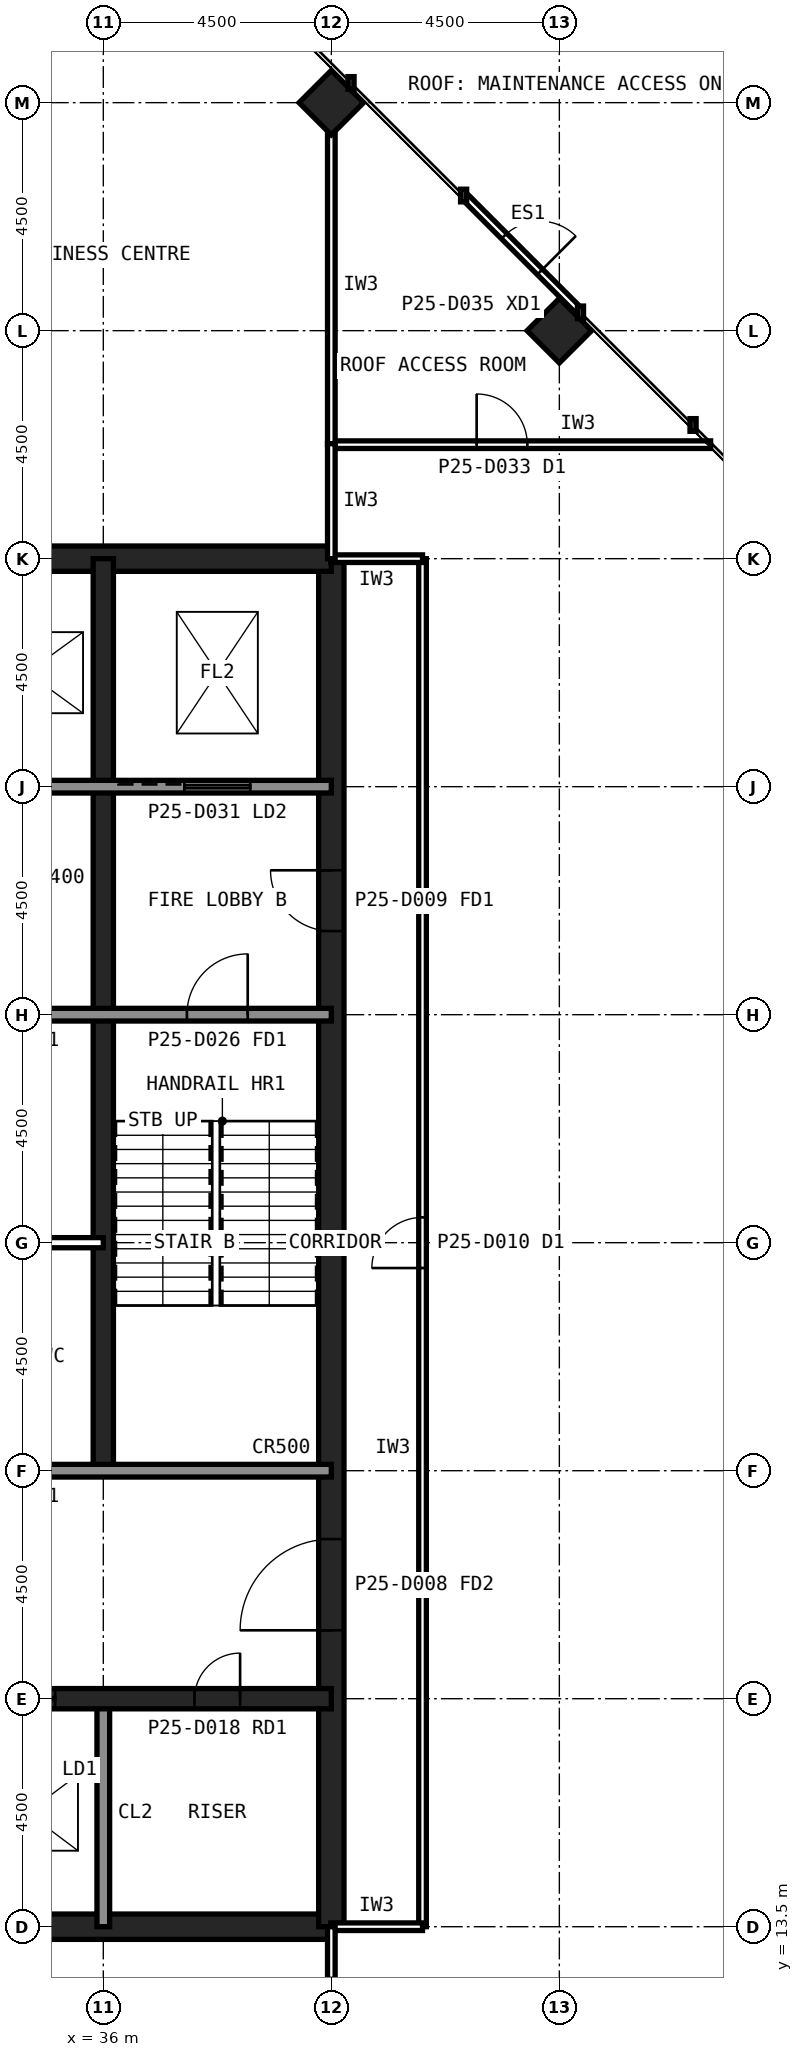
"""IFC4 building model, lengths in metres.
Left out: names, types, materials, properties, quantities, classifications, styles, units other than length and angle.
Written with IfcOpenShell. Run it as: python <this file> out.ifc"""

import sys

from ifc_helpers import new_model, si_unit, direction, frame, frame_2d, origin, origin_2d, place, context, subcontext, project, spatial, rectangle, hollow_rectangle, extrude, element, fill, save


model = new_model("IFC4")
c1 = context("Model", 3, precision=1e-05, world=origin(), true_north=direction((0.0, 1.0)))
c2 = subcontext(c1, "Body", "Model", "MODEL_VIEW")
j1 = project(units=[si_unit("LENGTHUNIT", "METRE"), si_unit("PLANEANGLEUNIT", "RADIAN")], contexts=[c1])
p1 = place(None, origin())
s1 = spatial("IfcSite", under=j1, at=p1, CompositionType="ELEMENT")
p2 = place(p1, origin())
s2 = spatial("IfcBuilding", under=s1, at=p2, CompositionType="ELEMENT")
p3 = place(p2, frame((0.0, 0.0, 110.6)))
s3 = spatial("IfcBuildingStorey", under=s2, at=p3, CompositionType="ELEMENT", Elevation=110.6)
for number, where, z_axis, x_axis in (
    (1, (45.0, 45.0, 0.0), (0.0, 0.0, 1.0), (0.707, 0.707, 0.0)),
    (2, (40.5, 49.5, 0.0), (0.0, 0.0, 1.0), (0.707, 0.707, 0.0)),
):
    element("IfcColumn", number, at=place(p3, frame(where, z_axis=z_axis, x_axis=x_axis)), inside=s3, PredefinedType="COLUMN", context=c2, shape_type="SweptSolid", body=[
        extrude(hollow_rectangle(XDim=0.9, YDim=0.9, WallThickness=0.063, at=origin_2d()), origin(), (0.0, 0.0, 1.0), 5.0),
    ])
p4 = place(p3, frame((13.5, 13.5, 0.0), z_axis=(0.0, 0.0, 1.0), x_axis=(1.0, 0.0, 0.0)))
e3 = element("IfcWall", 3, at=p4, inside=s3, PredefinedType="SHEAR", context=c2, shape_type="SweptSolid", body=[
    extrude(rectangle(XDim=27.0, YDim=0.5, at=frame_2d((13.5, 0.0))), origin(), (0.0, 0.0, 1.0), 5.0),
])
p5 = place(p3, frame((40.5, 13.5, 0.0), z_axis=(0.0, 0.0, 1.0), x_axis=(0.0, 1.0, 0.0)))
e4 = element("IfcWall", 4, at=p5, inside=s3, PredefinedType="SHEAR", context=c2, shape_type="SweptSolid", body=[
    extrude(rectangle(XDim=27.0, YDim=0.5, at=frame_2d((13.5, 0.0))), origin(), (0.0, 0.0, 1.0), 5.0),
])
p6 = place(p5, frame((5.85, 0.0, 0.0)))
e5 = element("IfcOpeningElement", 5, at=p6, cuts=e4, PredefinedType="OPENING", context=c2, shape_type="SweptSolid", body=[
    extrude(rectangle(XDim=1.8, YDim=2.1, at=frame_2d((0.9, 1.05))), frame((0.0, 0.26, 0.0), z_axis=(0.0, -1.0, 0.0), x_axis=(1.0, 0.0, 0.0)), (0.0, 0.0, 1.0), 0.52),
])
p7 = place(p5, frame((19.65, 0.0, 0.0)))
e6 = element("IfcOpeningElement", 6, at=p7, cuts=e4, PredefinedType="OPENING", context=c2, shape_type="SweptSolid", body=[
    extrude(rectangle(XDim=1.2, YDim=2.1, at=frame_2d((0.6, 1.05))), frame((0.0, 0.26, 0.0), z_axis=(0.0, -1.0, 0.0), x_axis=(1.0, 0.0, 0.0)), (0.0, 0.0, 1.0), 0.52),
])
p8 = place(p3, frame((40.5, 40.5, 0.0), z_axis=(0.0, 0.0, 1.0), x_axis=(-1.0, 0.0, 0.0)))
e7 = element("IfcWall", 7, at=p8, inside=s3, PredefinedType="SHEAR", context=c2, shape_type="SweptSolid", body=[
    extrude(rectangle(XDim=27.0, YDim=0.5, at=frame_2d((13.5, 0.0))), origin(), (0.0, 0.0, 1.0), 5.0),
])
p9 = place(p3, frame((36.0, 13.5, 0.0), z_axis=(0.0, 0.0, 1.0), x_axis=(0.0, 1.0, 0.0)))
e8 = element("IfcWall", 8, at=p9, inside=s3, PredefinedType="SOLIDWALL", context=c2, shape_type="SweptSolid", body=[
    extrude(rectangle(XDim=4.5, YDim=0.25, at=frame_2d((2.25, 0.0))), origin(), (0.0, 0.0, 1.0), 4.84),
])
p10 = place(p3, frame((36.0, 22.5, 0.0), z_axis=(0.0, 0.0, 1.0), x_axis=(0.0, 1.0, 0.0)))
e9 = element("IfcWall", 9, at=p10, inside=s3, PredefinedType="SHEAR", context=c2, shape_type="SweptSolid", body=[
    extrude(rectangle(XDim=18.0, YDim=0.4, at=frame_2d((9.0, 0.0))), origin(), (0.0, 0.0, 1.0), 5.0),
])
p11 = place(p3, frame((13.5, 18.0, 0.0), z_axis=(0.0, 0.0, 1.0), x_axis=(1.0, 0.0, 0.0)))
e10 = element("IfcWall", 10, at=p11, inside=s3, PredefinedType="SHEAR", context=c2, shape_type="SweptSolid", body=[
    extrude(rectangle(XDim=27.0, YDim=0.4, at=frame_2d((13.5, 0.0))), origin(), (0.0, 0.0, 1.0), 5.0),
])
p12 = place(p11, frame((24.3, 0.0, 0.0)))
e11 = element("IfcOpeningElement", 11, at=p12, cuts=e10, PredefinedType="OPENING", context=c2, shape_type="SweptSolid", body=[
    extrude(rectangle(XDim=0.9, YDim=2.1, at=frame_2d((0.45, 1.05))), frame((0.0, 0.21, 0.0), z_axis=(0.0, -1.0, 0.0), x_axis=(1.0, 0.0, 0.0)), (0.0, 0.0, 1.0), 0.42),
])
p13 = place(p11, frame((5.45, 0.0, 0.0)))
e12 = element("IfcOpeningElement", 12, at=p13, cuts=e10, PredefinedType="OPENING", context=c2, shape_type="SweptSolid", body=[
    extrude(rectangle(XDim=1.1, YDim=2.1, at=frame_2d((0.55, 1.05))), frame((0.0, 0.21, 0.0), z_axis=(0.0, -1.0, 0.0), x_axis=(1.0, 0.0, 0.0)), (0.0, 0.0, 1.0), 0.42),
])
p14 = place(p11, frame((8.45, 0.0, 0.0)))
e13 = element("IfcOpeningElement", 13, at=p14, cuts=e10, PredefinedType="OPENING", context=c2, shape_type="SweptSolid", body=[
    extrude(rectangle(XDim=1.1, YDim=2.1, at=frame_2d((0.55, 1.05))), frame((0.0, 0.21, 0.0), z_axis=(0.0, -1.0, 0.0), x_axis=(1.0, 0.0, 0.0)), (0.0, 0.0, 1.0), 0.42),
])
p15 = place(p11, frame((11.45, 0.0, 0.0)))
e14 = element("IfcOpeningElement", 14, at=p15, cuts=e10, PredefinedType="OPENING", context=c2, shape_type="SweptSolid", body=[
    extrude(rectangle(XDim=1.1, YDim=2.1, at=frame_2d((0.55, 1.05))), frame((0.0, 0.21, 0.0), z_axis=(0.0, -1.0, 0.0), x_axis=(1.0, 0.0, 0.0)), (0.0, 0.0, 1.0), 0.42),
])
p16 = place(p11, frame((14.45, 0.0, 0.0)))
e15 = element("IfcOpeningElement", 15, at=p16, cuts=e10, PredefinedType="OPENING", context=c2, shape_type="SweptSolid", body=[
    extrude(rectangle(XDim=1.1, YDim=2.1, at=frame_2d((0.55, 1.05))), frame((0.0, 0.21, 0.0), z_axis=(0.0, -1.0, 0.0), x_axis=(1.0, 0.0, 0.0)), (0.0, 0.0, 1.0), 0.42),
])
p17 = place(p11, frame((17.45, 0.0, 0.0)))
e16 = element("IfcOpeningElement", 16, at=p17, cuts=e10, PredefinedType="OPENING", context=c2, shape_type="SweptSolid", body=[
    extrude(rectangle(XDim=1.1, YDim=2.1, at=frame_2d((0.55, 1.05))), frame((0.0, 0.21, 0.0), z_axis=(0.0, -1.0, 0.0), x_axis=(1.0, 0.0, 0.0)), (0.0, 0.0, 1.0), 0.42),
])
p18 = place(p11, frame((20.45, 0.0, 0.0)))
e17 = element("IfcOpeningElement", 17, at=p18, cuts=e10, PredefinedType="OPENING", context=c2, shape_type="SweptSolid", body=[
    extrude(rectangle(XDim=1.1, YDim=2.1, at=frame_2d((0.55, 1.05))), frame((0.0, 0.21, 0.0), z_axis=(0.0, -1.0, 0.0), x_axis=(1.0, 0.0, 0.0)), (0.0, 0.0, 1.0), 0.42),
])
p19 = place(p11, frame((1.6, 0.0, 0.0)))
e18 = element("IfcOpeningElement", 18, at=p19, cuts=e10, PredefinedType="OPENING", context=c2, shape_type="SweptSolid", body=[
    extrude(rectangle(XDim=1.3, YDim=2.2, at=frame_2d((0.65, 1.1))), frame((0.0, 0.21, 0.0), z_axis=(0.0, -1.0, 0.0), x_axis=(1.0, 0.0, 0.0)), (0.0, 0.0, 1.0), 0.42),
])
p20 = place(p3, frame((13.5, 36.0, 0.0), z_axis=(0.0, 0.0, 1.0), x_axis=(1.0, 0.0, 0.0)))
e19 = element("IfcWall", 19, at=p20, inside=s3, PredefinedType="SOLIDWALL", context=c2, shape_type="SweptSolid", body=[
    extrude(rectangle(XDim=27.0, YDim=0.25, at=frame_2d((13.5, 0.0))), origin(), (0.0, 0.0, 1.0), 4.84),
])
p21 = place(p20, frame((1.8, 0.0, 0.0)))
e20 = element("IfcOpeningElement", 20, at=p21, cuts=e19, PredefinedType="OPENING", context=c2, shape_type="SweptSolid", body=[
    extrude(rectangle(XDim=0.9, YDim=2.1, at=frame_2d((0.45, 1.05))), frame((0.0, 0.135, 0.0), z_axis=(0.0, -1.0, 0.0), x_axis=(1.0, 0.0, 0.0)), (0.0, 0.0, 1.0), 0.27),
])
p22 = place(p20, frame((5.35, 0.0, 0.0)))
e21 = element("IfcOpeningElement", 21, at=p22, cuts=e19, PredefinedType="OPENING", context=c2, shape_type="SweptSolid", body=[
    extrude(rectangle(XDim=1.3, YDim=2.2, at=frame_2d((0.65, 1.1))), frame((0.0, 0.135, 0.0), z_axis=(0.0, -1.0, 0.0), x_axis=(1.0, 0.0, 0.0)), (0.0, 0.0, 1.0), 0.27),
])
p23 = place(p20, frame((8.35, 0.0, 0.0)))
e22 = element("IfcOpeningElement", 22, at=p23, cuts=e19, PredefinedType="OPENING", context=c2, shape_type="SweptSolid", body=[
    extrude(rectangle(XDim=1.3, YDim=2.2, at=frame_2d((0.65, 1.1))), frame((0.0, 0.135, 0.0), z_axis=(0.0, -1.0, 0.0), x_axis=(1.0, 0.0, 0.0)), (0.0, 0.0, 1.0), 0.27),
])
p24 = place(p20, frame((11.35, 0.0, 0.0)))
e23 = element("IfcOpeningElement", 23, at=p24, cuts=e19, PredefinedType="OPENING", context=c2, shape_type="SweptSolid", body=[
    extrude(rectangle(XDim=1.3, YDim=2.2, at=frame_2d((0.65, 1.1))), frame((0.0, 0.135, 0.0), z_axis=(0.0, -1.0, 0.0), x_axis=(1.0, 0.0, 0.0)), (0.0, 0.0, 1.0), 0.27),
])
p25 = place(p20, frame((24.1, 0.0, 0.0)))
e24 = element("IfcOpeningElement", 24, at=p25, cuts=e19, PredefinedType="OPENING", context=c2, shape_type="SweptSolid", body=[
    extrude(rectangle(XDim=1.3, YDim=2.2, at=frame_2d((0.65, 1.1))), frame((0.0, 0.135, 0.0), z_axis=(0.0, -1.0, 0.0), x_axis=(1.0, 0.0, 0.0)), (0.0, 0.0, 1.0), 0.27),
])
p26 = place(p3, frame((13.5, 22.5, 0.0), z_axis=(0.0, 0.0, 1.0), x_axis=(1.0, 0.0, 0.0)))
e25 = element("IfcWall", 25, at=p26, inside=s3, PredefinedType="SOLIDWALL", context=c2, shape_type="SweptSolid", body=[
    extrude(rectangle(XDim=27.0, YDim=0.25, at=frame_2d((13.5, 0.0))), origin(), (0.0, 0.0, 1.0), 4.84),
])
p27 = place(p26, frame((1.65, 0.0, 0.0)))
e26 = element("IfcOpeningElement", 26, at=p27, cuts=e25, PredefinedType="OPENING", context=c2, shape_type="SweptSolid", body=[
    extrude(rectangle(XDim=1.2, YDim=2.1, at=frame_2d((0.6, 1.05))), frame((0.0, 0.135, 0.0), z_axis=(0.0, -1.0, 0.0), x_axis=(1.0, 0.0, 0.0)), (0.0, 0.0, 1.0), 0.27),
])
p28 = place(p26, frame((6.025, 0.0, 0.0)))
e27 = element("IfcOpeningElement", 27, at=p28, cuts=e25, PredefinedType="OPENING", context=c2, shape_type="SweptSolid", body=[
    extrude(rectangle(XDim=1.0, YDim=2.1, at=frame_2d((0.5, 1.05))), frame((0.0, 0.135, 0.0), z_axis=(0.0, -1.0, 0.0), x_axis=(1.0, 0.0, 0.0)), (0.0, 0.0, 1.0), 0.27),
])
p29 = place(p26, frame((10.525, 0.0, 0.0)))
e28 = element("IfcOpeningElement", 28, at=p29, cuts=e25, PredefinedType="OPENING", context=c2, shape_type="SweptSolid", body=[
    extrude(rectangle(XDim=1.0, YDim=2.1, at=frame_2d((0.5, 1.05))), frame((0.0, 0.135, 0.0), z_axis=(0.0, -1.0, 0.0), x_axis=(1.0, 0.0, 0.0)), (0.0, 0.0, 1.0), 0.27),
])
p30 = place(p26, frame((19.75, 0.0, 0.0)))
e29 = element("IfcOpeningElement", 29, at=p30, cuts=e25, PredefinedType="OPENING", context=c2, shape_type="SweptSolid", body=[
    extrude(rectangle(XDim=1.0, YDim=2.1, at=frame_2d((0.5, 1.05))), frame((0.0, 0.135, 0.0), z_axis=(0.0, -1.0, 0.0), x_axis=(1.0, 0.0, 0.0)), (0.0, 0.0, 1.0), 0.27),
])
p31 = place(p26, frame((15.05, 0.0, 0.0)))
e30 = element("IfcOpeningElement", 30, at=p31, cuts=e25, PredefinedType="OPENING", context=c2, shape_type="SweptSolid", body=[
    extrude(rectangle(XDim=1.4, YDim=2.4, at=frame_2d((0.7, 1.2))), frame((0.0, 0.135, 0.0), z_axis=(0.0, -1.0, 0.0), x_axis=(1.0, 0.0, 0.0)), (0.0, 0.0, 1.0), 0.27),
])
p32 = place(p3, frame((13.5, 31.5, 0.0), z_axis=(0.0, 0.0, 1.0), x_axis=(1.0, 0.0, 0.0)))
e31 = element("IfcWall", 31, at=p32, inside=s3, PredefinedType="SOLIDWALL", context=c2, shape_type="SweptSolid", body=[
    extrude(rectangle(XDim=27.0, YDim=0.25, at=frame_2d((13.5, 0.0))), origin(), (0.0, 0.0, 1.0), 4.84),
])
p33 = place(p32, frame((24.15, 0.0, 0.0)))
e32 = element("IfcOpeningElement", 32, at=p33, cuts=e31, PredefinedType="OPENING", context=c2, shape_type="SweptSolid", body=[
    extrude(rectangle(XDim=1.2, YDim=2.1, at=frame_2d((0.6, 1.05))), frame((0.0, 0.135, 0.0), z_axis=(0.0, -1.0, 0.0), x_axis=(1.0, 0.0, 0.0)), (0.0, 0.0, 1.0), 0.27),
])
p34 = place(p32, frame((15.3, 0.0, 0.0)))
e33 = element("IfcOpeningElement", 33, at=p34, cuts=e31, PredefinedType="OPENING", context=c2, shape_type="SweptSolid", body=[
    extrude(rectangle(XDim=0.9, YDim=2.1, at=frame_2d((0.45, 1.05))), frame((0.0, 0.135, 0.0), z_axis=(0.0, -1.0, 0.0), x_axis=(1.0, 0.0, 0.0)), (0.0, 0.0, 1.0), 0.27),
])
p35 = place(p32, frame((19.8, 0.0, 0.0)))
e34 = element("IfcOpeningElement", 34, at=p35, cuts=e31, PredefinedType="OPENING", context=c2, shape_type="SweptSolid", body=[
    extrude(rectangle(XDim=0.9, YDim=2.1, at=frame_2d((0.45, 1.05))), frame((0.0, 0.135, 0.0), z_axis=(0.0, -1.0, 0.0), x_axis=(1.0, 0.0, 0.0)), (0.0, 0.0, 1.0), 0.27),
])
p36 = place(p3, frame((43.139, 47.639, 0.0), z_axis=(0.0, 0.0, 1.0), x_axis=(0.707106781187, -0.707106781187, 0.0)))
e35 = element("IfcWall", 35, at=p36, inside=s3, PredefinedType="USERDEFINED", context=c2, shape_type="SweptSolid", body=[
    extrude(rectangle(XDim=3.182, YDim=0.15, at=frame_2d((1.591, 0.0))), origin(), (0.0, 0.0, 1.0), 5.0),
])
p37 = place(p36, frame((1.091, 0.0, 0.0)))
e36 = element("IfcOpeningElement", 36, at=p37, cuts=e35, PredefinedType="OPENING", context=c2, shape_type="SweptSolid", body=[
    extrude(rectangle(XDim=1.0, YDim=2.1, at=frame_2d((0.5, 1.05))), frame((0.0, 0.085, 0.0), z_axis=(0.0, -1.0, 0.0), x_axis=(1.0, 0.0, 0.0)), (0.0, 0.0, 1.0), 0.17),
])
p38 = place(p3, frame((27.0, 27.0, 0.0), z_axis=(0.0, 0.0, 1.0), x_axis=(1.0, 0.0, 0.0)))
e37 = element("IfcWall", 37, at=p38, inside=s3, PredefinedType="PARTITIONING", context=c2, shape_type="SweptSolid", body=[
    extrude(rectangle(XDim=9.0, YDim=0.2, at=frame_2d((4.5, 0.0))), origin(), (0.0, 0.0, 1.0), 4.84),
])
p39 = place(p3, frame((42.3, 13.5, 0.0), z_axis=(0.0, 0.0, 1.0), x_axis=(0.0, 1.0, 0.0)))
e38 = element("IfcWall", 38, at=p39, inside=s3, PredefinedType="PARTITIONING", context=c2, shape_type="SweptSolid", body=[
    extrude(rectangle(XDim=27.0, YDim=0.15, at=frame_2d((13.5, 0.0))), origin(), (0.0, 0.0, 1.0), 4.84),
])
p40 = place(p39, frame((13.0, 0.0, 0.0)))
e39 = element("IfcOpeningElement", 39, at=p40, cuts=e38, PredefinedType="OPENING", context=c2, shape_type="SweptSolid", body=[
    extrude(rectangle(XDim=1.0, YDim=2.1, at=frame_2d((0.5, 1.05))), frame((0.0, 0.085, 0.0), z_axis=(0.0, -1.0, 0.0), x_axis=(1.0, 0.0, 0.0)), (0.0, 0.0, 1.0), 0.17),
])
for number, where, z_axis, x_axis in (
    (40, (40.49, 13.5, 0.0), (0.0, 0.0, 1.0), (1.0, 0.0, 0.0)),
    (41, (42.3, 40.5, 0.0), (0.0, 0.0, 1.0), (-1.0, 0.0, 0.0)),
):
    element("IfcWall", number, at=place(p3, frame(where, z_axis=z_axis, x_axis=x_axis)), inside=s3, PredefinedType="PARTITIONING", context=c2, shape_type="SweptSolid", body=[
        extrude(rectangle(XDim=1.81, YDim=0.15, at=frame_2d((0.905, 0.0))), origin(), (0.0, 0.0, 1.0), 3.989),
    ])
p41 = place(p3, frame((40.5, 42.75, 0.0), z_axis=(0.0, 0.0, 1.0), x_axis=(1.0, 0.0, 0.0)))
e42 = element("IfcWall", 42, at=p41, inside=s3, PredefinedType="PARTITIONING", context=c2, shape_type="SweptSolid", body=[
    extrude(rectangle(XDim=7.485, YDim=0.15, at=frame_2d((3.743, 0.0))), origin(), (0.0, 0.0, 1.0), 4.84),
])
p42 = place(p41, frame((2.868, 0.0, 0.0)))
e43 = element("IfcOpeningElement", 43, at=p42, cuts=e42, PredefinedType="OPENING", context=c2, shape_type="SweptSolid", body=[
    extrude(rectangle(XDim=1.0, YDim=2.1, at=frame_2d((0.5, 1.05))), frame((0.0, 0.085, 0.0), z_axis=(0.0, -1.0, 0.0), x_axis=(1.0, 0.0, 0.0)), (0.0, 0.0, 1.0), 0.17),
])
p43 = place(p3, frame((40.5, 49.04, 0.0), z_axis=(0.0, 0.0, 1.0), x_axis=(0.0, -1.0, 0.0)))
e44 = element("IfcWall", 44, at=p43, inside=s3, PredefinedType="PARTITIONING", context=c2, shape_type="SweptSolid", body=[
    extrude(rectangle(XDim=6.29, YDim=0.15, at=frame_2d((3.145, 0.0))), origin(), (0.0, 0.0, 1.0), 3.989),
])
p44 = place(p3, frame((40.5, 42.77, 0.0), z_axis=(0.0, 0.0, 1.0), x_axis=(0.0, -1.0, 0.0)))
e45 = element("IfcWall", 45, at=p44, inside=s3, PredefinedType="PARTITIONING", context=c2, shape_type="SweptSolid", body=[
    extrude(rectangle(XDim=2.27, YDim=0.15, at=frame_2d((1.135, 0.0))), origin(), (0.0, 0.0, 1.0), 3.989),
])
p45 = place(p3, frame((40.5, 10.48, 0.0), z_axis=(0.0, 0.0, 1.0), x_axis=(0.0, 1.0, 0.0)))
e46 = element("IfcWall", 46, at=p45, inside=s3, PredefinedType="PARTITIONING", context=c2, shape_type="SweptSolid", body=[
    extrude(rectangle(XDim=3.02, YDim=0.15, at=frame_2d((1.51, 0.0))), origin(), (0.0, 0.0, 1.0), 3.989),
])
p46 = place(p45, frame((1.01, 0.0, 0.0)))
e47 = element("IfcOpeningElement", 47, at=p46, cuts=e46, PredefinedType="OPENING", context=c2, shape_type="SweptSolid", body=[
    extrude(rectangle(XDim=1.0, YDim=2.1, at=frame_2d((0.5, 1.05))), frame((0.0, 0.085, 0.0), z_axis=(0.0, -1.0, 0.0), x_axis=(1.0, 0.0, 0.0)), (0.0, 0.0, 1.0), 0.17),
])
p47 = place(p37, origin())
e48 = element("IfcDoor", 48, at=p47, inside=s3, OperationType="SINGLE_SWING_RIGHT", PredefinedType="DOOR", context=c2, shape_type="SweptSolid", body=[
    extrude(rectangle(XDim=1.0, YDim=2.1, at=frame_2d((0.5, 1.05))), frame((0.0, 0.025, 0.0), z_axis=(0.0, -1.0, 0.0), x_axis=(1.0, 0.0, 0.0)), (0.0, 0.0, 1.0), 0.05),
])
fill(e36, e48)
p48 = place(p6, origin())
e49 = element("IfcDoor", 49, at=p48, inside=s3, OperationType="SINGLE_SWING_LEFT", PredefinedType="DOOR", context=c2, shape_type="SweptSolid", body=[
    extrude(rectangle(XDim=1.8, YDim=2.1, at=frame_2d((0.9, 1.05))), frame((0.0, 0.025, 0.0), z_axis=(0.0, -1.0, 0.0), x_axis=(1.0, 0.0, 0.0)), (0.0, 0.0, 1.0), 0.05),
])
fill(e5, e49)
p49 = place(p7, origin())
e50 = element("IfcDoor", 50, at=p49, inside=s3, OperationType="SINGLE_SWING_RIGHT", PredefinedType="DOOR", context=c2, shape_type="SweptSolid", body=[
    extrude(rectangle(XDim=1.2, YDim=2.1, at=frame_2d((0.6, 1.05))), frame((0.0, 0.025, 0.0), z_axis=(0.0, -1.0, 0.0), x_axis=(1.0, 0.0, 0.0)), (0.0, 0.0, 1.0), 0.05),
])
fill(e6, e50)
p50 = place(p33, origin())
e51 = element("IfcDoor", 51, at=p50, inside=s3, OperationType="SINGLE_SWING_RIGHT", PredefinedType="DOOR", context=c2, shape_type="SweptSolid", body=[
    extrude(rectangle(XDim=1.2, YDim=2.1, at=frame_2d((0.6, 1.05))), frame((0.0, 0.025, 0.0), z_axis=(0.0, -1.0, 0.0), x_axis=(1.0, 0.0, 0.0)), (0.0, 0.0, 1.0), 0.05),
])
fill(e32, e51)
p51 = place(p12, origin())
e52 = element("IfcDoor", 52, at=p51, inside=s3, OperationType="SINGLE_SWING_RIGHT", PredefinedType="DOOR", context=c2, shape_type="SweptSolid", body=[
    extrude(rectangle(XDim=0.9, YDim=2.1, at=frame_2d((0.45, 1.05))), frame((0.0, 0.025, 0.0), z_axis=(0.0, -1.0, 0.0), x_axis=(1.0, 0.0, 0.0)), (0.0, 0.0, 1.0), 0.05),
])
fill(e11, e52)
p52 = place(p18, origin())
e53 = element("IfcDoor", 53, at=p52, inside=s3, OperationType="SLIDING_TO_LEFT", PredefinedType="DOOR", context=c2, shape_type="SweptSolid", body=[
    extrude(rectangle(XDim=1.1, YDim=2.1, at=frame_2d((0.55, 1.05))), frame((0.0, 0.025, 0.0), z_axis=(0.0, -1.0, 0.0), x_axis=(1.0, 0.0, 0.0)), (0.0, 0.0, 1.0), 0.05),
])
fill(e17, e53)
p53 = place(p25, origin())
e54 = element("IfcDoor", 54, at=p53, inside=s3, OperationType="SLIDING_TO_LEFT", PredefinedType="DOOR", context=c2, shape_type="SweptSolid", body=[
    extrude(rectangle(XDim=1.3, YDim=2.2, at=frame_2d((0.65, 1.1))), frame((0.0, 0.025, 0.0), z_axis=(0.0, -1.0, 0.0), x_axis=(1.0, 0.0, 0.0)), (0.0, 0.0, 1.0), 0.05),
])
fill(e24, e54)
p54 = place(p40, origin())
e55 = element("IfcDoor", 55, at=p54, inside=s3, OperationType="SINGLE_SWING_LEFT", PredefinedType="DOOR", context=c2, shape_type="SweptSolid", body=[
    extrude(rectangle(XDim=1.0, YDim=2.1, at=frame_2d((0.5, 1.05))), frame((0.0, 0.025, 0.0), z_axis=(0.0, -1.0, 0.0), x_axis=(1.0, 0.0, 0.0)), (0.0, 0.0, 1.0), 0.05),
])
fill(e39, e55)
p55 = place(p42, origin())
e56 = element("IfcDoor", 56, at=p55, inside=s3, OperationType="SINGLE_SWING_LEFT", PredefinedType="DOOR", context=c2, shape_type="SweptSolid", body=[
    extrude(rectangle(XDim=1.0, YDim=2.1, at=frame_2d((0.5, 1.05))), frame((0.0, 0.025, 0.0), z_axis=(0.0, -1.0, 0.0), x_axis=(1.0, 0.0, 0.0)), (0.0, 0.0, 1.0), 0.05),
])
fill(e43, e56)
save(model, sys.argv[1])
